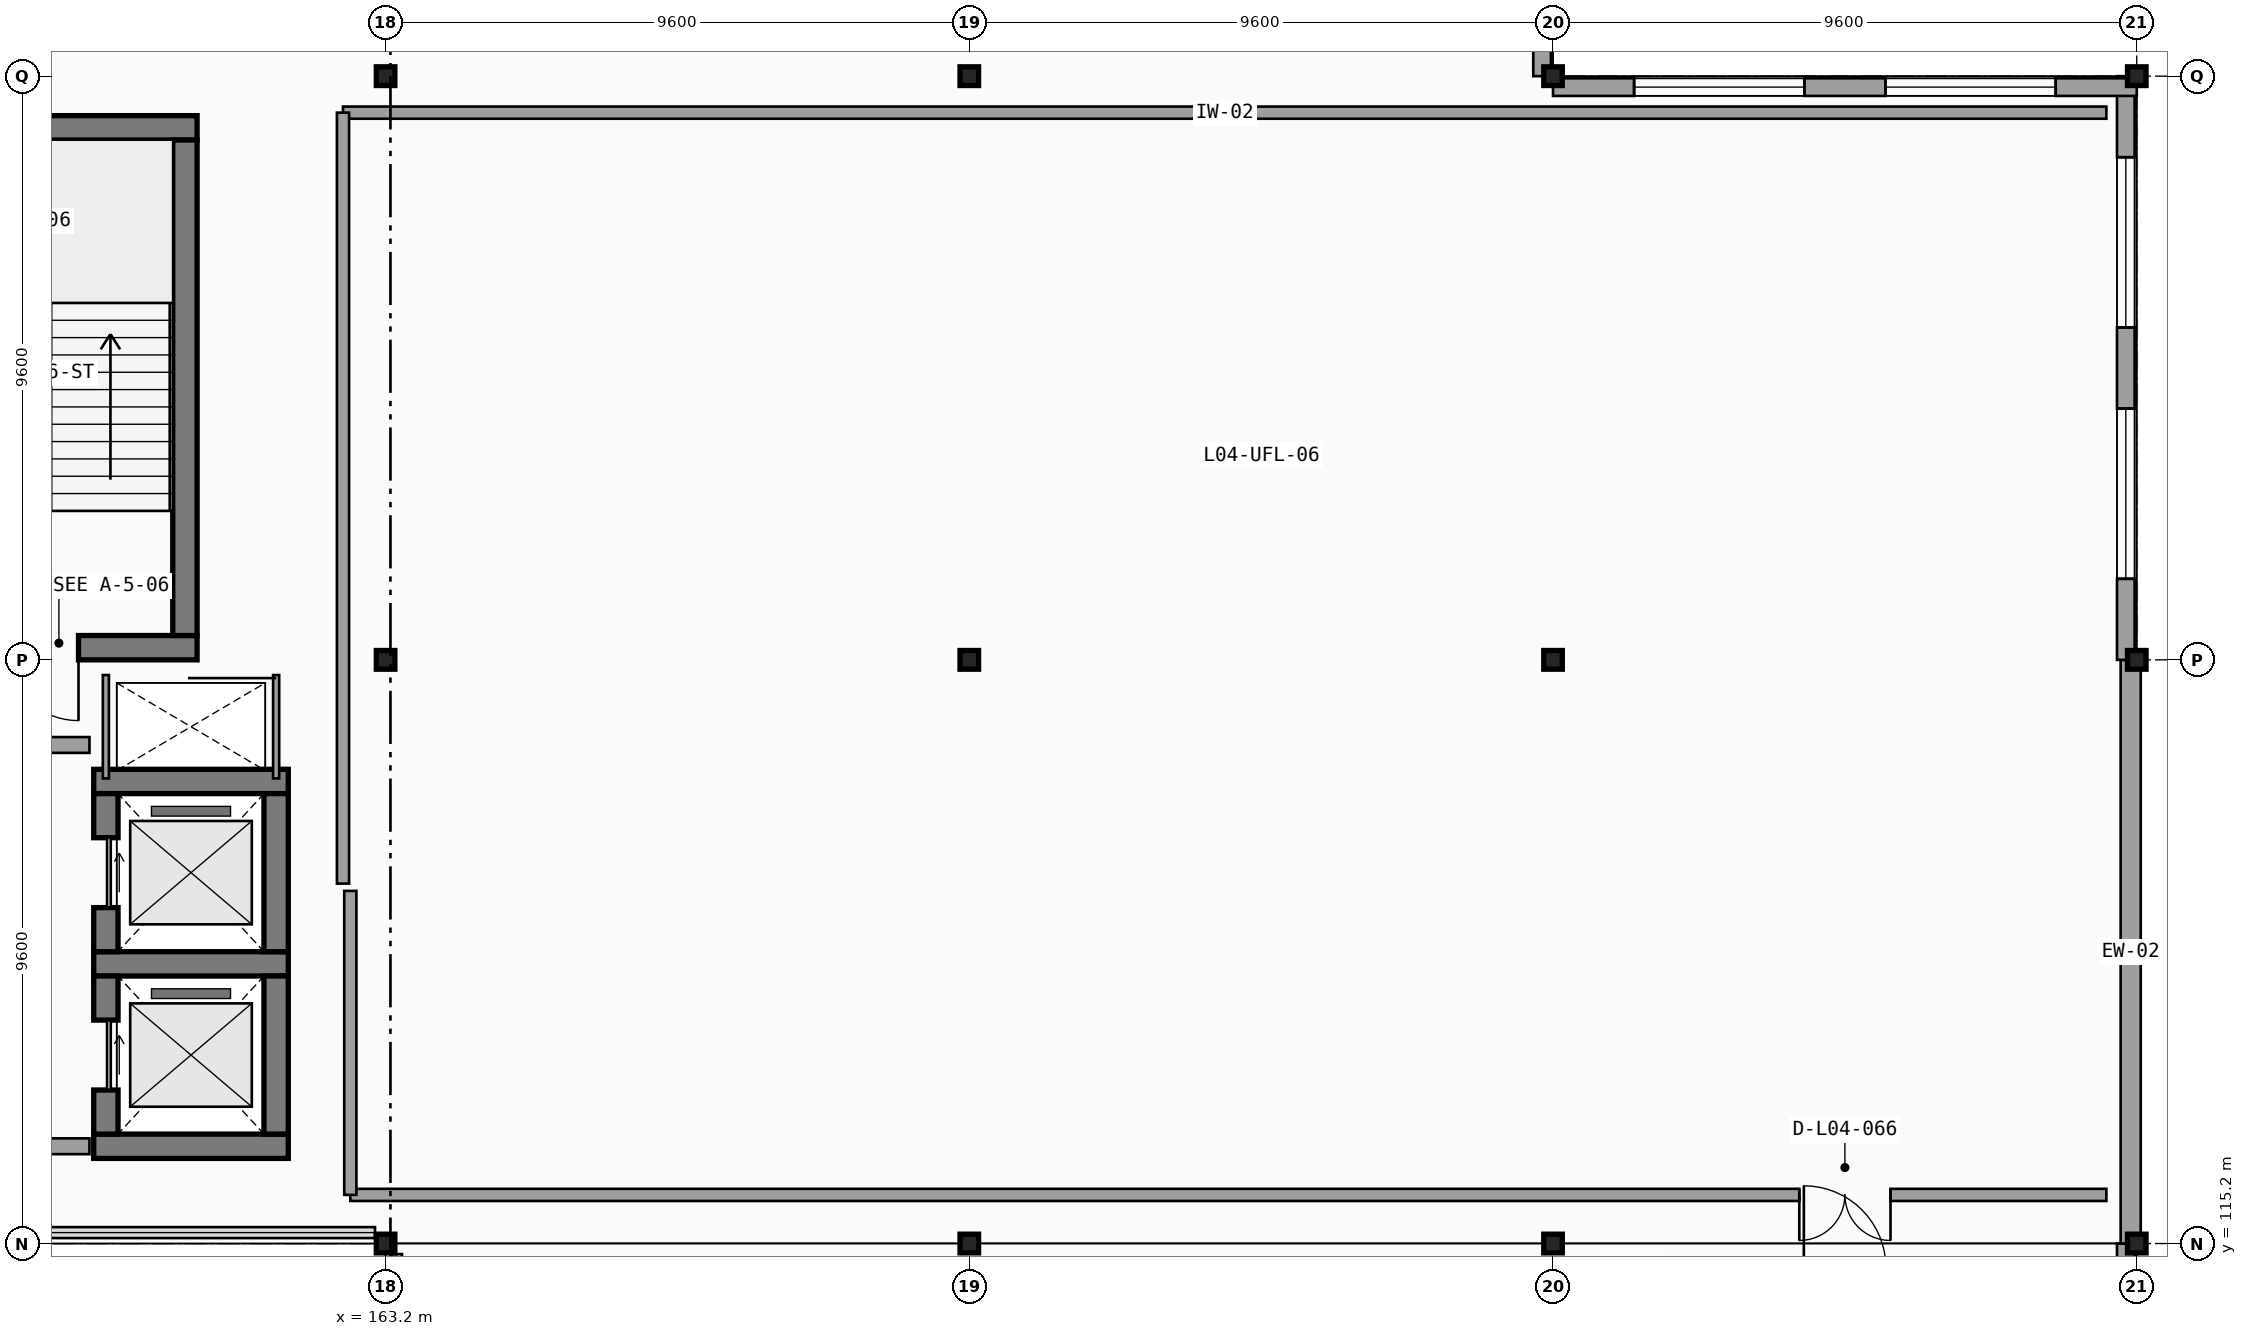
"""IFC4 building model, lengths in metres.
Left out: names, types, materials, properties, quantities, classifications, styles, units other than length and angle.
Written with IfcOpenShell. Run it as: python <this file> out.ifc"""

import sys

from ifc_helpers import new_model, si_unit, direction, frame, frame_2d, origin, origin_2d, place, context, subcontext, project, spatial, rectangle, i_section, extrude, element, fill, save


model = new_model("IFC4")
c1 = context("Model", 3, precision=1e-05, world=origin(), true_north=direction((0.0, 1.0)))
c2 = subcontext(c1, "Body", "Model", "MODEL_VIEW")
j1 = project(units=[si_unit("LENGTHUNIT", "METRE"), si_unit("PLANEANGLEUNIT", "RADIAN")], contexts=[c1])
p1 = place(None, origin())
s1 = spatial("IfcSite", under=j1, at=p1, CompositionType="ELEMENT")
p2 = place(p1, origin())
s2 = spatial("IfcBuilding", under=s1, at=p2, CompositionType="ELEMENT")
p3 = place(p2, frame((0.0, 0.0, 18.6)))
s3 = spatial("IfcBuildingStorey", under=s2, at=p3, CompositionType="ELEMENT", Elevation=18.6)
for number, where, z_axis, x_axis in (
    (1, (163.2, 115.2, 0.0), (0.0, 0.0, 1.0), (1.0, 0.0, 0.0)),
    (2, (163.2, 124.8, 0.0), (0.0, 0.0, 1.0), (1.0, 0.0, 0.0)),
    (3, (163.2, 134.4, 0.0), (0.0, 0.0, 1.0), (1.0, 0.0, 0.0)),
    (4, (172.8, 115.2, 0.0), (0.0, 0.0, 1.0), (1.0, 0.0, 0.0)),
    (5, (172.8, 124.8, 0.0), (0.0, 0.0, 1.0), (1.0, 0.0, 0.0)),
    (6, (172.8, 134.4, 0.0), (0.0, 0.0, 1.0), (1.0, 0.0, 0.0)),
    (7, (182.4, 115.2, 0.0), (0.0, 0.0, 1.0), (1.0, 0.0, 0.0)),
    (8, (182.4, 124.8, 0.0), (0.0, 0.0, 1.0), (1.0, 0.0, 0.0)),
    (9, (182.4, 134.4, 0.0), (0.0, 0.0, 1.0), (1.0, 0.0, 0.0)),
    (10, (192.0, 115.2, 0.0), (0.0, 0.0, 1.0), (1.0, 0.0, 0.0)),
    (11, (192.0, 124.8, 0.0), (0.0, 0.0, 1.0), (1.0, 0.0, 0.0)),
    (12, (192.0, 134.4, 0.0), (0.0, 0.0, 1.0), (1.0, 0.0, 0.0)),
):
    element("IfcColumn", number, at=place(p3, frame(where, z_axis=z_axis, x_axis=x_axis)), inside=s3, PredefinedType="COLUMN", context=c2, shape_type="SweptSolid", body=[
        extrude(i_section(OverallWidth=0.305, OverallDepth=0.308, WebThickness=0.01, FlangeThickness=0.015, FilletRadius=0.013, at=origin_2d()), origin(), (0.0, 0.0, 1.0), 4.5),
    ])
p4 = place(p3, frame((191.82, 105.6, 0.0), z_axis=(0.0, 0.0, 1.0), x_axis=(0.0, 1.0, 0.0)))
e13 = element("IfcWall", 13, at=p4, inside=s3, PredefinedType="SOLIDWALL", context=c2, shape_type="SweptSolid", body=[
    extrude(rectangle(XDim=9.6, YDim=0.29, at=frame_2d((4.8, 0.0))), origin(), (0.0, 0.0, 1.0), 3.313),
])
p5 = place(p4, frame((4.133, 0.0, 0.95), z_axis=(0.0, 0.0, 1.0), x_axis=(-1.0, 0.0, 0.0)))
e14 = element("IfcOpeningElement", 14, at=p5, cuts=e13, PredefinedType="OPENING", context=c2, shape_type="SweptSolid", body=[
    extrude(rectangle(XDim=2.8, YDim=1.9, at=frame_2d((1.4, 0.95))), frame((0.0, 0.155, 0.0), z_axis=(0.0, -1.0, 0.0), x_axis=(1.0, 0.0, 0.0)), (0.0, 0.0, 1.0), 0.31),
])
p6 = place(p4, frame((8.267, 0.0, 0.95), z_axis=(0.0, 0.0, 1.0), x_axis=(-1.0, 0.0, 0.0)))
e15 = element("IfcOpeningElement", 15, at=p6, cuts=e13, PredefinedType="OPENING", context=c2, shape_type="SweptSolid", body=[
    extrude(rectangle(XDim=2.8, YDim=1.9, at=frame_2d((1.4, 0.95))), frame((0.0, 0.155, 0.0), z_axis=(0.0, -1.0, 0.0), x_axis=(1.0, 0.0, 0.0)), (0.0, 0.0, 1.0), 0.31),
])
p7 = place(p3, frame((191.9, 115.2, 0.0), z_axis=(0.0, 0.0, 1.0), x_axis=(0.0, 1.0, 0.0)))
e16 = element("IfcWall", 16, at=p7, inside=s3, PredefinedType="SOLIDWALL", context=c2, shape_type="SweptSolid", body=[
    extrude(rectangle(XDim=9.6, YDim=0.33, at=frame_2d((4.8, 0.0))), origin(), (0.0, 0.0, 1.0), 3.313),
])
p8 = place(p3, frame((191.82, 124.8, 0.0), z_axis=(0.0, 0.0, 1.0), x_axis=(0.0, 1.0, 0.0)))
e17 = element("IfcWall", 17, at=p8, inside=s3, PredefinedType="SOLIDWALL", context=c2, shape_type="SweptSolid", body=[
    extrude(rectangle(XDim=9.6, YDim=0.29, at=frame_2d((4.8, 0.0))), origin(), (0.0, 0.0, 1.0), 3.49),
])
p9 = place(p8, frame((4.133, 0.0, 0.95), z_axis=(0.0, 0.0, 1.0), x_axis=(-1.0, 0.0, 0.0)))
e18 = element("IfcOpeningElement", 18, at=p9, cuts=e17, PredefinedType="OPENING", context=c2, shape_type="SweptSolid", body=[
    extrude(rectangle(XDim=2.8, YDim=1.9, at=frame_2d((1.4, 0.95))), frame((0.0, 0.155, 0.0), z_axis=(0.0, -1.0, 0.0), x_axis=(1.0, 0.0, 0.0)), (0.0, 0.0, 1.0), 0.31),
])
p10 = place(p8, frame((8.267, 0.0, 0.95), z_axis=(0.0, 0.0, 1.0), x_axis=(-1.0, 0.0, 0.0)))
e19 = element("IfcOpeningElement", 19, at=p10, cuts=e17, PredefinedType="OPENING", context=c2, shape_type="SweptSolid", body=[
    extrude(rectangle(XDim=2.8, YDim=1.9, at=frame_2d((1.4, 0.95))), frame((0.0, 0.155, 0.0), z_axis=(0.0, -1.0, 0.0), x_axis=(1.0, 0.0, 0.0)), (0.0, 0.0, 1.0), 0.31),
])
p11 = place(p3, frame((192.0, 134.22, 0.0), z_axis=(0.0, 0.0, 1.0), x_axis=(-1.0, 0.0, 0.0)))
e20 = element("IfcWall", 20, at=p11, inside=s3, PredefinedType="SOLIDWALL", context=c2, shape_type="SweptSolid", body=[
    extrude(rectangle(XDim=9.6, YDim=0.29, at=frame_2d((4.8, 0.0))), origin(), (0.0, 0.0, 1.0), 3.49),
])
p12 = place(p11, frame((4.133, 0.0, 0.95), z_axis=(0.0, 0.0, 1.0), x_axis=(-1.0, 0.0, 0.0)))
e21 = element("IfcOpeningElement", 21, at=p12, cuts=e20, PredefinedType="OPENING", context=c2, shape_type="SweptSolid", body=[
    extrude(rectangle(XDim=2.8, YDim=1.9, at=frame_2d((1.4, 0.95))), frame((0.0, 0.155, 0.0), z_axis=(0.0, -1.0, 0.0), x_axis=(1.0, 0.0, 0.0)), (0.0, 0.0, 1.0), 0.31),
])
p13 = place(p11, frame((8.267, 0.0, 0.95), z_axis=(0.0, 0.0, 1.0), x_axis=(-1.0, 0.0, 0.0)))
e22 = element("IfcOpeningElement", 22, at=p13, cuts=e20, PredefinedType="OPENING", context=c2, shape_type="SweptSolid", body=[
    extrude(rectangle(XDim=2.8, YDim=1.9, at=frame_2d((1.4, 0.95))), frame((0.0, 0.155, 0.0), z_axis=(0.0, -1.0, 0.0), x_axis=(1.0, 0.0, 0.0)), (0.0, 0.0, 1.0), 0.31),
])
p14 = place(p3, frame((182.22, 134.4, 0.0), z_axis=(0.0, 0.0, 1.0), x_axis=(0.0, 1.0, 0.0)))
e23 = element("IfcWall", 23, at=p14, inside=s3, PredefinedType="SOLIDWALL", context=c2, shape_type="SweptSolid", body=[
    extrude(rectangle(XDim=9.6, YDim=0.29, at=frame_2d((4.8, 0.0))), origin(), (0.0, 0.0, 1.0), 3.49),
])
p15 = place(p14, frame((4.133, 0.0, 0.95), z_axis=(0.0, 0.0, 1.0), x_axis=(-1.0, 0.0, 0.0)))
e24 = element("IfcOpeningElement", 24, at=p15, cuts=e23, PredefinedType="OPENING", context=c2, shape_type="SweptSolid", body=[
    extrude(rectangle(XDim=2.8, YDim=1.9, at=frame_2d((1.4, 0.95))), frame((0.0, 0.155, 0.0), z_axis=(0.0, -1.0, 0.0), x_axis=(1.0, 0.0, 0.0)), (0.0, 0.0, 1.0), 0.31),
])
p16 = place(p14, frame((8.267, 0.0, 0.95), z_axis=(0.0, 0.0, 1.0), x_axis=(-1.0, 0.0, 0.0)))
e25 = element("IfcOpeningElement", 25, at=p16, cuts=e23, PredefinedType="OPENING", context=c2, shape_type="SweptSolid", body=[
    extrude(rectangle(XDim=2.8, YDim=1.9, at=frame_2d((1.4, 0.95))), frame((0.0, 0.155, 0.0), z_axis=(0.0, -1.0, 0.0), x_axis=(1.0, 0.0, 0.0)), (0.0, 0.0, 1.0), 0.31),
])
p17 = place(p3, frame((155.0, 125.0, 0.0), z_axis=(0.0, 0.0, 1.0), x_axis=(1.0, 0.0, 0.0)))
e26 = element("IfcWall", 26, at=p17, inside=s3, PredefinedType="SHEAR", context=c2, shape_type="SweptSolid", body=[
    extrude(rectangle(XDim=5.1, YDim=0.4, at=frame_2d((2.55, 0.0))), origin(), (0.0, 0.0, 1.0), 4.24),
])
p18 = place(p17, frame((3.15, 0.0, 0.0), z_axis=(0.0, 0.0, 1.0), x_axis=(-1.0, 0.0, 0.0)))
e27 = element("IfcOpeningElement", 27, at=p18, cuts=e26, PredefinedType="OPENING", context=c2, shape_type="SweptSolid", body=[
    extrude(rectangle(XDim=1.2, YDim=2.2, at=frame_2d((0.6, 1.1))), frame((0.0, 0.21, 0.0), z_axis=(0.0, -1.0, 0.0), x_axis=(1.0, 0.0, 0.0)), (0.0, 0.0, 1.0), 0.42),
])
p19 = place(p3, frame((160.1, 133.55, 0.0), z_axis=(0.0, 0.0, 1.0), x_axis=(-1.0, 0.0, 0.0)))
e28 = element("IfcWall", 28, at=p19, inside=s3, PredefinedType="SHEAR", context=c2, shape_type="SweptSolid", body=[
    extrude(rectangle(XDim=5.1, YDim=0.4, at=frame_2d((2.55, 0.0))), origin(), (0.0, 0.0, 1.0), 4.24),
])
p20 = place(p3, frame((159.9, 125.2, 0.0), z_axis=(0.0, 0.0, 1.0), x_axis=(0.0, 1.0, 0.0)))
e29 = element("IfcWall", 29, at=p20, inside=s3, PredefinedType="SHEAR", context=c2, shape_type="SweptSolid", body=[
    extrude(rectangle(XDim=8.15, YDim=0.4, at=frame_2d((4.075, 0.0))), origin(), (0.0, 0.0, 1.0), 4.24),
])
for number, where, z_axis, x_axis in (
    (30, (158.4, 116.8, 0.0), (0.0, 0.0, 1.0), (1.0, 0.0, 0.0)),
    (31, (161.6, 119.8, 0.0), (0.0, 0.0, 1.0), (-1.0, 0.0, 0.0)),
):
    element("IfcWall", number, at=place(p3, frame(where, z_axis=z_axis, x_axis=x_axis)), inside=s3, PredefinedType="SHEAR", context=c2, shape_type="SweptSolid", body=[
        extrude(rectangle(XDim=3.2, YDim=0.4, at=frame_2d((1.6, 0.0))), origin(), (0.0, 0.0, 1.0), 4.24),
    ])
p21 = place(p3, frame((158.6, 119.6, 0.0), z_axis=(0.0, 0.0, 1.0), x_axis=(0.0, -1.0, 0.0)))
e32 = element("IfcWall", 32, at=p21, inside=s3, PredefinedType="SHEAR", context=c2, shape_type="SweptSolid", body=[
    extrude(rectangle(XDim=2.6, YDim=0.4, at=frame_2d((1.3, 0.0))), origin(), (0.0, 0.0, 1.0), 4.24),
])
p22 = place(p21, frame((0.725, 0.0, 0.0), z_axis=(0.0, 0.0, 1.0), x_axis=(1.0, 0.0, 0.0)))
e33 = element("IfcOpeningElement", 33, at=p22, cuts=e32, PredefinedType="OPENING", context=c2, shape_type="SweptSolid", body=[
    extrude(rectangle(XDim=1.15, YDim=2.2, at=frame_2d((0.575, 1.1))), frame((0.0, 0.21, 0.0), z_axis=(0.0, -1.0, 0.0), x_axis=(1.0, 0.0, 0.0)), (0.0, 0.0, 1.0), 0.42),
])
p23 = place(p3, frame((161.4, 117.0, 0.0), z_axis=(0.0, 0.0, 1.0), x_axis=(0.0, 1.0, 0.0)))
e34 = element("IfcWall", 34, at=p23, inside=s3, PredefinedType="SHEAR", context=c2, shape_type="SweptSolid", body=[
    extrude(rectangle(XDim=2.6, YDim=0.4, at=frame_2d((1.3, 0.0))), origin(), (0.0, 0.0, 1.0), 4.24),
])
p24 = place(p3, frame((161.6, 122.8, 0.0), z_axis=(0.0, 0.0, 1.0), x_axis=(-1.0, 0.0, 0.0)))
e35 = element("IfcWall", 35, at=p24, inside=s3, PredefinedType="SHEAR", context=c2, shape_type="SweptSolid", body=[
    extrude(rectangle(XDim=3.2, YDim=0.4, at=frame_2d((1.6, 0.0))), origin(), (0.0, 0.0, 1.0), 4.24),
])
p25 = place(p3, frame((158.6, 122.6, 0.0), z_axis=(0.0, 0.0, 1.0), x_axis=(0.0, -1.0, 0.0)))
e36 = element("IfcWall", 36, at=p25, inside=s3, PredefinedType="SHEAR", context=c2, shape_type="SweptSolid", body=[
    extrude(rectangle(XDim=2.6, YDim=0.4, at=frame_2d((1.3, 0.0))), origin(), (0.0, 0.0, 1.0), 4.24),
])
p26 = place(p25, frame((0.725, 0.0, 0.0), z_axis=(0.0, 0.0, 1.0), x_axis=(1.0, 0.0, 0.0)))
e37 = element("IfcOpeningElement", 37, at=p26, cuts=e36, PredefinedType="OPENING", context=c2, shape_type="SweptSolid", body=[
    extrude(rectangle(XDim=1.15, YDim=2.2, at=frame_2d((0.575, 1.1))), frame((0.0, 0.21, 0.0), z_axis=(0.0, -1.0, 0.0), x_axis=(1.0, 0.0, 0.0)), (0.0, 0.0, 1.0), 0.42),
])
p27 = place(p3, frame((161.4, 120.0, 0.0), z_axis=(0.0, 0.0, 1.0), x_axis=(0.0, 1.0, 0.0)))
e38 = element("IfcWall", 38, at=p27, inside=s3, PredefinedType="SHEAR", context=c2, shape_type="SweptSolid", body=[
    extrude(rectangle(XDim=2.6, YDim=0.4, at=frame_2d((1.3, 0.0))), origin(), (0.0, 0.0, 1.0), 4.24),
])
for number, where, z_axis, x_axis in (
    (39, (158.6, 124.55, 0.0), (0.0, 0.0, 1.0), (0.0, -1.0, 0.0)),
    (40, (161.4, 122.85, 0.0), (0.0, 0.0, 1.0), (0.0, 1.0, 0.0)),
):
    element("IfcWall", number, at=place(p3, frame(where, z_axis=z_axis, x_axis=x_axis)), inside=s3, PredefinedType="PARTITIONING", context=c2, shape_type="SweptSolid", body=[
        extrude(rectangle(XDim=1.7, YDim=0.1, at=frame_2d((0.85, 0.0))), origin(), (0.0, 0.0, 1.0), 4.24),
    ])
p28 = place(p3, frame((154.67, 116.8, 0.0), z_axis=(0.0, 0.0, 1.0), x_axis=(1.0, 0.0, 0.0)))
e41 = element("IfcWall", 41, at=p28, inside=s3, PredefinedType="SOLIDWALL", context=c2, shape_type="SweptSolid", body=[
    extrude(rectangle(XDim=3.66, YDim=0.26, at=frame_2d((1.83, 0.0))), origin(), (0.0, 0.0, 1.0), 4.24),
])
p29 = place(p3, frame((158.33, 123.4, 0.0), z_axis=(0.0, 0.0, 1.0), x_axis=(-1.0, 0.0, 0.0)))
e42 = element("IfcWall", 42, at=p29, inside=s3, PredefinedType="SOLIDWALL", context=c2, shape_type="SweptSolid", body=[
    extrude(rectangle(XDim=3.66, YDim=0.26, at=frame_2d((1.83, 0.0))), origin(), (0.0, 0.0, 1.0), 4.24),
])
p30 = place(p29, frame((2.755, 0.0, 0.0), z_axis=(0.0, 0.0, 1.0), x_axis=(-1.0, 0.0, 0.0)))
e43 = element("IfcOpeningElement", 43, at=p30, cuts=e42, PredefinedType="OPENING", context=c2, shape_type="SweptSolid", body=[
    extrude(rectangle(XDim=1.85, YDim=2.25, at=frame_2d((0.925, 1.125))), frame((0.0, 0.14, 0.0), z_axis=(0.0, -1.0, 0.0), x_axis=(1.0, 0.0, 0.0)), (0.0, 0.0, 1.0), 0.28),
])
p31 = place(p3, frame((162.5, 133.8, 0.0), z_axis=(0.0, 0.0, 1.0), x_axis=(1.0, 0.0, 0.0)))
e44 = element("IfcWall", 44, at=p31, inside=s3, PredefinedType="PARTITIONING", context=c2, shape_type="SweptSolid", body=[
    extrude(rectangle(XDim=29.0, YDim=0.2, at=frame_2d((14.5, 0.0))), origin(), (0.0, 0.0, 1.0), 3.49),
])
p32 = place(p3, frame((191.5, 116.0, 0.0), z_axis=(0.0, 0.0, 1.0), x_axis=(-1.0, 0.0, 0.0)))
e45 = element("IfcWall", 45, at=p32, inside=s3, PredefinedType="PARTITIONING", context=c2, shape_type="SweptSolid", body=[
    extrude(rectangle(XDim=28.88, YDim=0.2, at=frame_2d((14.44, 0.0))), origin(), (0.0, 0.0, 1.0), 3.313),
])
p33 = place(p32, frame((3.55, 0.0, 0.0), z_axis=(0.0, 0.0, 1.0), x_axis=(1.0, 0.0, 0.0)))
e46 = element("IfcOpeningElement", 46, at=p33, cuts=e45, PredefinedType="OPENING", context=c2, shape_type="SweptSolid", body=[
    extrude(rectangle(XDim=1.5, YDim=2.25, at=frame_2d((0.75, 1.125))), frame((0.0, 0.11, 0.0), z_axis=(0.0, -1.0, 0.0), x_axis=(1.0, 0.0, 0.0)), (0.0, 0.0, 1.0), 0.22),
])
p34 = place(p3, frame((162.62, 116.0, 0.0), z_axis=(0.0, 0.0, 1.0), x_axis=(0.0, 1.0, 0.0)))
e47 = element("IfcWall", 47, at=p34, inside=s3, PredefinedType="PARTITIONING", context=c2, shape_type="SweptSolid", body=[
    extrude(rectangle(XDim=5.0, YDim=0.2, at=frame_2d((2.5, 0.0))), origin(), (0.0, 0.0, 1.0), 4.24),
])
p35 = place(p3, frame((162.5, 121.12, 0.0), z_axis=(0.0, 0.0, 1.0), x_axis=(0.0, 1.0, 0.0)))
e48 = element("IfcWall", 48, at=p35, inside=s3, PredefinedType="PARTITIONING", context=c2, shape_type="SweptSolid", body=[
    extrude(rectangle(XDim=12.68, YDim=0.2, at=frame_2d((6.34, 0.0))), origin(), (0.0, 0.0, 1.0), 3.562),
])
p36 = place(p9, origin())
e49 = element("IfcWindow", 49, at=p36, inside=s3, PartitioningType="SINGLE_PANEL", PredefinedType="WINDOW", context=c2, shape_type="SweptSolid", body=[
    extrude(rectangle(XDim=2.8, YDim=1.9, at=frame_2d((1.4, 0.95))), frame((0.0, 0.03, 0.0), z_axis=(0.0, -1.0, 0.0), x_axis=(1.0, 0.0, 0.0)), (0.0, 0.0, 1.0), 0.06),
])
fill(e18, e49)
p37 = place(p10, origin())
e50 = element("IfcWindow", 50, at=p37, inside=s3, PartitioningType="SINGLE_PANEL", PredefinedType="WINDOW", context=c2, shape_type="SweptSolid", body=[
    extrude(rectangle(XDim=2.8, YDim=1.9, at=frame_2d((1.4, 0.95))), frame((0.0, 0.03, 0.0), z_axis=(0.0, -1.0, 0.0), x_axis=(1.0, 0.0, 0.0)), (0.0, 0.0, 1.0), 0.06),
])
fill(e19, e50)
p38 = place(p12, origin())
e51 = element("IfcWindow", 51, at=p38, inside=s3, PartitioningType="SINGLE_PANEL", PredefinedType="WINDOW", context=c2, shape_type="SweptSolid", body=[
    extrude(rectangle(XDim=2.8, YDim=1.9, at=frame_2d((1.4, 0.95))), frame((0.0, 0.03, 0.0), z_axis=(0.0, -1.0, 0.0), x_axis=(1.0, 0.0, 0.0)), (0.0, 0.0, 1.0), 0.06),
])
fill(e21, e51)
p39 = place(p13, origin())
e52 = element("IfcWindow", 52, at=p39, inside=s3, PartitioningType="SINGLE_PANEL", PredefinedType="WINDOW", context=c2, shape_type="SweptSolid", body=[
    extrude(rectangle(XDim=2.8, YDim=1.9, at=frame_2d((1.4, 0.95))), frame((0.0, 0.03, 0.0), z_axis=(0.0, -1.0, 0.0), x_axis=(1.0, 0.0, 0.0)), (0.0, 0.0, 1.0), 0.06),
])
fill(e22, e52)
p40 = place(p18, origin())
e53 = element("IfcDoor", 53, at=p40, inside=s3, OperationType="SINGLE_SWING_LEFT", PredefinedType="DOOR", context=c2, shape_type="SweptSolid", body=[
    extrude(rectangle(XDim=1.2, YDim=2.2, at=frame_2d((0.6, 1.1))), frame((0.0, 0.025, 0.0), z_axis=(0.0, -1.0, 0.0), x_axis=(1.0, 0.0, 0.0)), (0.0, 0.0, 1.0), 0.05),
])
fill(e27, e53)
p41 = place(p22, origin())
e54 = element("IfcDoor", 54, at=p41, inside=s3, OperationType="SLIDING_TO_LEFT", PredefinedType="DOOR", context=c2, shape_type="SweptSolid", body=[
    extrude(rectangle(XDim=1.15, YDim=2.2, at=frame_2d((0.575, 1.1))), frame((0.0, 0.025, 0.0), z_axis=(0.0, -1.0, 0.0), x_axis=(1.0, 0.0, 0.0)), (0.0, 0.0, 1.0), 0.05),
])
fill(e33, e54)
p42 = place(p26, origin())
e55 = element("IfcDoor", 55, at=p42, inside=s3, OperationType="SLIDING_TO_LEFT", PredefinedType="DOOR", context=c2, shape_type="SweptSolid", body=[
    extrude(rectangle(XDim=1.15, YDim=2.2, at=frame_2d((0.575, 1.1))), frame((0.0, 0.025, 0.0), z_axis=(0.0, -1.0, 0.0), x_axis=(1.0, 0.0, 0.0)), (0.0, 0.0, 1.0), 0.05),
])
fill(e37, e55)
p43 = place(p33, origin())
e56 = element("IfcDoor", 56, at=p43, inside=s3, OperationType="DOUBLE_DOOR_SINGLE_SWING", PredefinedType="DOOR", context=c2, shape_type="SweptSolid", body=[
    extrude(rectangle(XDim=1.5, YDim=2.25, at=frame_2d((0.75, 1.125))), frame((0.0, 0.025, 0.0), z_axis=(0.0, -1.0, 0.0), x_axis=(1.0, 0.0, 0.0)), (0.0, 0.0, 1.0), 0.05),
])
fill(e46, e56)
save(model, sys.argv[1])
